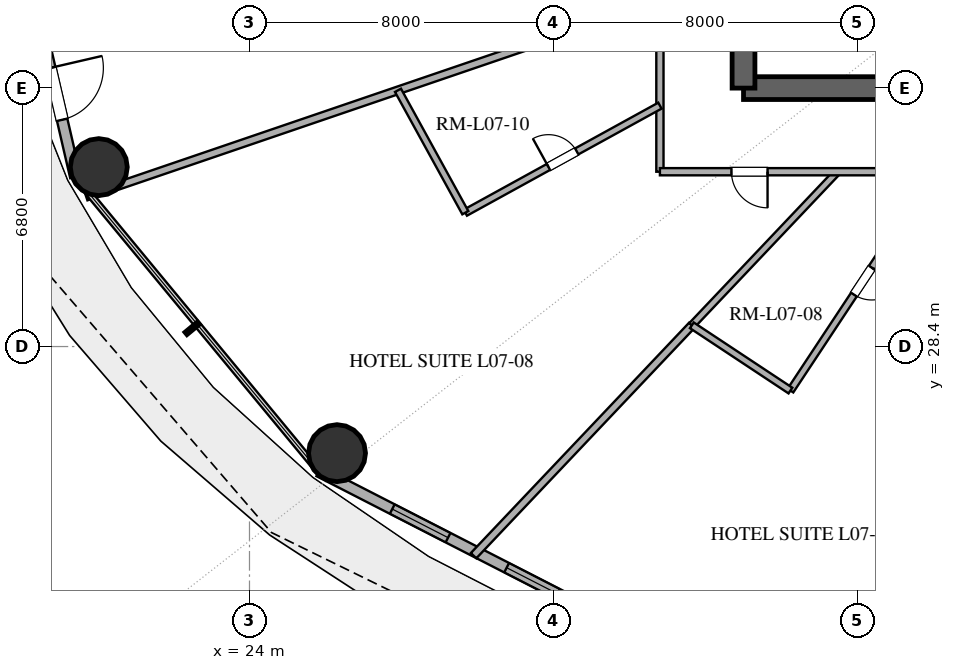
"""IFC4 building model, lengths in metres.
Left out: names, types, materials, properties, quantities, classifications, styles, units other than length and angle.
Written with IfcOpenShell. Run it as: python <this file> out.ifc"""

import sys

from ifc_helpers import new_model, si_unit, direction, frame, frame_2d, origin, origin_2d, place, context, subcontext, project, spatial, rectangle, hollow_circle, extrude, element, fill, save


model = new_model("IFC4")
c1 = context("Model", 3, precision=1e-05, world=origin(), true_north=direction((0.0, 1.0)))
c2 = subcontext(c1, "Body", "Model", "MODEL_VIEW")
j1 = project(units=[si_unit("LENGTHUNIT", "METRE"), si_unit("PLANEANGLEUNIT", "RADIAN")], contexts=[c1])
p1 = place(None, origin())
s1 = spatial("IfcSite", under=j1, at=p1, CompositionType="ELEMENT")
p2 = place(p1, origin())
s2 = spatial("IfcBuilding", under=s1, at=p2, CompositionType="ELEMENT")
p3 = place(p2, frame((0.0, 0.0, 35.4)))
s3 = spatial("IfcBuildingStorey", under=s2, at=p3, CompositionType="ELEMENT", Elevation=35.4)
p4 = place(p3, frame((37.0, 35.2, 0.0), z_axis=(0.0, 0.0, 1.0), x_axis=(1.0, 0.0, 0.0)))
e1 = element("IfcWall", 1, at=p4, inside=s3, PredefinedType="SHEAR", context=c2, shape_type="SweptSolid", body=[
    extrude(rectangle(XDim=4.0, YDim=0.6, at=frame_2d((2.0, 0.0))), origin(), (0.0, 0.0, 1.0), 3.38),
])
p5 = place(p3, frame((37.0, 35.2, 0.0), z_axis=(0.0, 0.0, 1.0), x_axis=(0.0, 1.0, 0.0)))
e2 = element("IfcWall", 2, at=p5, inside=s3, PredefinedType="SHEAR", context=c2, shape_type="SweptSolid", body=[
    extrude(rectangle(XDim=13.6, YDim=0.6, at=frame_2d((6.8, 0.0))), origin(), (0.0, 0.0, 1.0), 3.38),
])
p6 = place(p5, frame((1.5, 0.0, 0.0)))
e3 = element("IfcOpeningElement", 3, at=p6, cuts=e2, PredefinedType="OPENING", context=c2, shape_type="SweptSolid", body=[
    extrude(rectangle(XDim=1.2, YDim=2.15, at=frame_2d((0.6, 1.075))), frame((0.0, 0.31, 0.0), z_axis=(0.0, -1.0, 0.0), x_axis=(1.0, 0.0, 0.0)), (0.0, 0.0, 1.0), 0.62),
])
for number, where, z_axis, x_axis in (
    (4, (20.034, 33.122, 0.0), (0.0, 0.0, 1.0), (1.0, 0.0, 0.0)),
    (5, (26.303, 25.595, 0.0), (0.0, 0.0, 1.0), (1.0, 0.0, 0.0)),
):
    element("IfcColumn", number, at=place(p3, frame(where, z_axis=z_axis, x_axis=x_axis)), inside=s3, PredefinedType="COLUMN", context=c2, shape_type="SweptSolid", body=[
        extrude(hollow_circle(Radius=0.75, WallThickness=0.04, at=origin_2d()), origin(), (0.0, 0.0, 1.0), 3.38),
    ])
p7 = place(p3, frame((17.304, 42.0, 0.0), z_axis=(0.0, 0.0, 1.0), x_axis=(0.225454452941, -0.974253709076, 0.0)))
e6 = element("IfcWall", 6, at=p7, inside=s3, PredefinedType="SOLIDWALL", context=c2, shape_type="SweptSolid", body=[
    extrude(rectangle(XDim=9.38, YDim=0.28, at=frame_2d((4.69, 0.0))), origin(), (0.0, 0.0, 1.0), 3.38),
])
p8 = place(p7, frame((6.435, 0.0, 0.0)))
e7 = element("IfcOpeningElement", 7, at=p8, cuts=e6, PredefinedType="OPENING", context=c2, shape_type="SweptSolid", body=[
    extrude(rectangle(XDim=1.4, YDim=2.2, at=frame_2d((0.7, 1.1))), frame((0.0, 0.15, 0.0), z_axis=(0.0, -1.0, 0.0), x_axis=(1.0, 0.0, 0.0)), (0.0, 0.0, 1.0), 0.3),
])
p9 = place(p3, frame((25.826, 25.114, 0.0), z_axis=(0.0, 0.0, 1.0), x_axis=(0.889853976658, -0.456245438581, 0.0)))
e8 = element("IfcWall", 8, at=p9, inside=s3, PredefinedType="SOLIDWALL", context=c2, shape_type="SweptSolid", body=[
    extrude(rectangle(XDim=11.346, YDim=0.28, at=frame_2d((5.673, 0.0))), origin(), (0.0, 0.0, 1.0), 3.38),
])
p10 = place(p9, frame((2.17, 0.0, 0.85)))
e9 = element("IfcOpeningElement", 9, at=p10, cuts=e8, PredefinedType="OPENING", context=c2, shape_type="SweptSolid", body=[
    extrude(rectangle(XDim=1.65, YDim=2.0, at=frame_2d((0.825, 1.0))), frame((0.0, 0.15, 0.0), z_axis=(0.0, -1.0, 0.0), x_axis=(1.0, 0.0, 0.0)), (0.0, 0.0, 1.0), 0.3),
])
p11 = place(p9, frame((5.553, 0.0, 0.85)))
e10 = element("IfcOpeningElement", 10, at=p11, cuts=e8, PredefinedType="OPENING", context=c2, shape_type="SweptSolid", body=[
    extrude(rectangle(XDim=1.5, YDim=2.0, at=frame_2d((0.75, 1.0))), frame((0.0, 0.15, 0.0), z_axis=(0.0, -1.0, 0.0), x_axis=(1.0, 0.0, 0.0)), (0.0, 0.0, 1.0), 0.3),
])
p12 = place(p9, frame((7.722, 0.0, 0.85)))
e11 = element("IfcOpeningElement", 11, at=p12, cuts=e8, PredefinedType="OPENING", context=c2, shape_type="SweptSolid", body=[
    extrude(rectangle(XDim=1.5, YDim=2.0, at=frame_2d((0.75, 1.0))), frame((0.0, 0.15, 0.0), z_axis=(0.0, -1.0, 0.0), x_axis=(1.0, 0.0, 0.0)), (0.0, 0.0, 1.0), 0.3),
])
p13 = place(p3, frame((34.8, 37.494, 0.0), z_axis=(0.0, 0.0, 1.0), x_axis=(-0.946390715793, -0.32302416792, 0.0)))
e12 = element("IfcWall", 12, at=p13, inside=s3, PredefinedType="PARTITIONING", context=c2, shape_type="SweptSolid", body=[
    extrude(rectangle(XDim=15.952, YDim=0.2, at=frame_2d((7.976, 0.0))), origin(), (0.0, 0.0, 1.0), 2.74),
])
p14 = place(p3, frame((29.897, 22.898, 0.0), z_axis=(0.0, 0.0, 1.0), x_axis=(0.687860615602, 0.725842802198, 0.0)))
e13 = element("IfcWall", 13, at=p14, inside=s3, PredefinedType="PARTITIONING", context=c2, shape_type="SweptSolid", body=[
    extrude(rectangle(XDim=8.35, YDim=0.2, at=frame_2d((4.175, 0.0))), origin(), (0.0, 0.0, 1.0), 2.74),
])
p15 = place(p3, frame((42.045, 33.0, 0.0), z_axis=(0.0, 0.0, 1.0), x_axis=(-0.551832909025, -0.833954699319, 0.0)))
e14 = element("IfcWall", 14, at=p15, inside=s3, PredefinedType="PLUMBINGWALL", context=c2, shape_type="SweptSolid", body=[
    extrude(rectangle(XDim=6.905, YDim=0.18, at=frame_2d((3.452, 0.0))), origin(), (0.0, 0.0, 1.0), 2.74),
])
p16 = place(p15, frame((3.027, 0.0, 0.0)))
e15 = element("IfcOpeningElement", 15, at=p16, cuts=e14, PredefinedType="OPENING", context=c2, shape_type="SweptSolid", body=[
    extrude(rectangle(XDim=0.85, YDim=2.1, at=frame_2d((0.425, 1.05))), frame((0.0, 0.1, 0.0), z_axis=(0.0, -1.0, 0.0), x_axis=(1.0, 0.0, 0.0)), (0.0, 0.0, 1.0), 0.2),
])
p17 = place(p3, frame((34.8, 33.0, 0.0), z_axis=(0.0, 0.0, 1.0), x_axis=(0.0, 1.0, 0.0)))
e16 = element("IfcWall", 16, at=p17, inside=s3, PredefinedType="PARTITIONING", context=c2, shape_type="SweptSolid", body=[
    extrude(rectangle(XDim=18.0, YDim=0.19, at=frame_2d((9.0, 0.0))), origin(), (0.0, 0.0, 1.0), 2.74),
])
p18 = place(p17, frame((7.274, 0.0, 0.0)))
e17 = element("IfcOpeningElement", 17, at=p18, cuts=e16, PredefinedType="OPENING", context=c2, shape_type="SweptSolid", body=[
    extrude(rectangle(XDim=1.0, YDim=2.2, at=frame_2d((0.5, 1.1))), frame((0.0, 0.105, 0.0), z_axis=(0.0, -1.0, 0.0), x_axis=(1.0, 0.0, 0.0)), (0.0, 0.0, 1.0), 0.21),
])
p19 = place(p17, frame((12.854, 0.0, 0.0)))
e18 = element("IfcOpeningElement", 18, at=p19, cuts=e16, PredefinedType="OPENING", context=c2, shape_type="SweptSolid", body=[
    extrude(rectangle(XDim=0.95, YDim=2.15, at=frame_2d((0.475, 1.075))), frame((0.0, 0.105, 0.0), z_axis=(0.0, -1.0, 0.0), x_axis=(1.0, 0.0, 0.0)), (0.0, 0.0, 1.0), 0.21),
])
p20 = place(p3, frame((29.679, 31.922, 0.0), z_axis=(0.0, 0.0, 1.0), x_axis=(0.876185038284, 0.481974873503, 0.0)))
e19 = element("IfcWall", 19, at=p20, inside=s3, PredefinedType="PLUMBINGWALL", context=c2, shape_type="SweptSolid", body=[
    extrude(rectangle(XDim=5.844, YDim=0.18, at=frame_2d((2.922, 0.0))), origin(), (0.0, 0.0, 1.0), 2.74),
])
p21 = place(p20, frame((2.497, 0.0, 0.0)))
e20 = element("IfcOpeningElement", 20, at=p21, cuts=e19, PredefinedType="OPENING", context=c2, shape_type="SweptSolid", body=[
    extrude(rectangle(XDim=0.85, YDim=2.1, at=frame_2d((0.425, 1.05))), frame((0.0, 0.1, 0.0), z_axis=(0.0, -1.0, 0.0), x_axis=(1.0, 0.0, 0.0)), (0.0, 0.0, 1.0), 0.2),
])
p22 = place(p3, frame((35.64, 28.958, 0.0), z_axis=(0.0, 0.0, 1.0), x_axis=(0.687867465085, 0.725836311077, 0.0)))
e21 = element("IfcWall", 21, at=p22, inside=s3, PredefinedType="PLUMBINGWALL", context=c2, shape_type="SweptSolid", body=[
    extrude(rectangle(XDim=5.568, YDim=0.18, at=frame_2d((2.784, 0.0))), origin(), (0.0, 0.0, 1.0), 2.74),
])
p23 = place(p3, frame((42.083, 33.0, 0.0), z_axis=(0.0, 0.0, 1.0), x_axis=(-1.0, 0.0, 0.0)))
e22 = element("IfcWall", 22, at=p23, inside=s3, PredefinedType="PARTITIONING", context=c2, shape_type="SweptSolid", body=[
    extrude(rectangle(XDim=7.283, YDim=0.19, at=frame_2d((3.642, 0.0))), origin(), (0.0, 0.0, 1.0), 2.74),
])
p24 = place(p23, frame((4.451, 0.0, 0.0)))
e23 = element("IfcOpeningElement", 23, at=p24, cuts=e22, PredefinedType="OPENING", context=c2, shape_type="SweptSolid", body=[
    extrude(rectangle(XDim=0.95, YDim=2.15, at=frame_2d((0.475, 1.075))), frame((0.0, 0.105, 0.0), z_axis=(0.0, -1.0, 0.0), x_axis=(1.0, 0.0, 0.0)), (0.0, 0.0, 1.0), 0.21),
])
p25 = place(p3, frame((27.908, 35.142, 0.0), z_axis=(0.0, 0.0, 1.0), x_axis=(0.481967195945, -0.876189261537, 0.0)))
e24 = element("IfcWall", 24, at=p25, inside=s3, PredefinedType="PLUMBINGWALL", context=c2, shape_type="SweptSolid", body=[
    extrude(rectangle(XDim=3.676, YDim=0.18, at=frame_2d((1.838, 0.0))), origin(), (0.0, 0.0, 1.0), 2.74),
])
p26 = place(p3, frame((38.235, 27.242, 0.0), z_axis=(0.0, 0.0, 1.0), x_axis=(-0.833965136837, 0.551817135055, 0.0)))
e25 = element("IfcWall", 25, at=p26, inside=s3, PredefinedType="PLUMBINGWALL", context=c2, shape_type="SweptSolid", body=[
    extrude(rectangle(XDim=3.111, YDim=0.18, at=frame_2d((1.555, 0.0))), origin(), (0.0, 0.0, 1.0), 2.74),
])
p27 = place(p8, origin())
e26 = element("IfcDoor", 26, at=p27, inside=s3, OperationType="SINGLE_SWING_LEFT", PredefinedType="DOOR", context=c2, shape_type="SweptSolid", body=[
    extrude(rectangle(XDim=1.4, YDim=2.2, at=frame_2d((0.7, 1.1))), frame((0.0, 0.025, 0.0), z_axis=(0.0, -1.0, 0.0), x_axis=(1.0, 0.0, 0.0)), (0.0, 0.0, 1.0), 0.05),
])
fill(e7, e26)
p28 = place(p10, origin())
e27 = element("IfcWindow", 27, at=p28, inside=s3, PartitioningType="SINGLE_PANEL", PredefinedType="WINDOW", context=c2, shape_type="SweptSolid", body=[
    extrude(rectangle(XDim=1.65, YDim=2.0, at=frame_2d((0.825, 1.0))), frame((0.0, 0.03, 0.0), z_axis=(0.0, -1.0, 0.0), x_axis=(1.0, 0.0, 0.0)), (0.0, 0.0, 1.0), 0.06),
])
fill(e9, e27)
p29 = place(p11, origin())
e28 = element("IfcWindow", 28, at=p29, inside=s3, PartitioningType="SINGLE_PANEL", PredefinedType="WINDOW", context=c2, shape_type="SweptSolid", body=[
    extrude(rectangle(XDim=1.5, YDim=2.0, at=frame_2d((0.75, 1.0))), frame((0.0, 0.03, 0.0), z_axis=(0.0, -1.0, 0.0), x_axis=(1.0, 0.0, 0.0)), (0.0, 0.0, 1.0), 0.06),
])
fill(e10, e28)
p30 = place(p16, origin())
e29 = element("IfcDoor", 29, at=p30, inside=s3, OperationType="SINGLE_SWING_LEFT", PredefinedType="DOOR", context=c2, shape_type="SweptSolid", body=[
    extrude(rectangle(XDim=0.85, YDim=2.1, at=frame_2d((0.425, 1.05))), frame((0.0, 0.025, 0.0), z_axis=(0.0, -1.0, 0.0), x_axis=(1.0, 0.0, 0.0)), (0.0, 0.0, 1.0), 0.05),
])
fill(e15, e29)
p31 = place(p21, origin())
e30 = element("IfcDoor", 30, at=p31, inside=s3, OperationType="SINGLE_SWING_LEFT", PredefinedType="DOOR", context=c2, shape_type="SweptSolid", body=[
    extrude(rectangle(XDim=0.85, YDim=2.1, at=frame_2d((0.425, 1.05))), frame((0.0, 0.025, 0.0), z_axis=(0.0, -1.0, 0.0), x_axis=(1.0, 0.0, 0.0)), (0.0, 0.0, 1.0), 0.05),
])
fill(e20, e30)
p32 = place(p24, origin())
e31 = element("IfcDoor", 31, at=p32, inside=s3, OperationType="SINGLE_SWING_LEFT", PredefinedType="DOOR", context=c2, shape_type="SweptSolid", body=[
    extrude(rectangle(XDim=0.95, YDim=2.15, at=frame_2d((0.475, 1.075))), frame((0.0, 0.025, 0.0), z_axis=(0.0, -1.0, 0.0), x_axis=(1.0, 0.0, 0.0)), (0.0, 0.0, 1.0), 0.05),
])
fill(e23, e31)
save(model, sys.argv[1])
